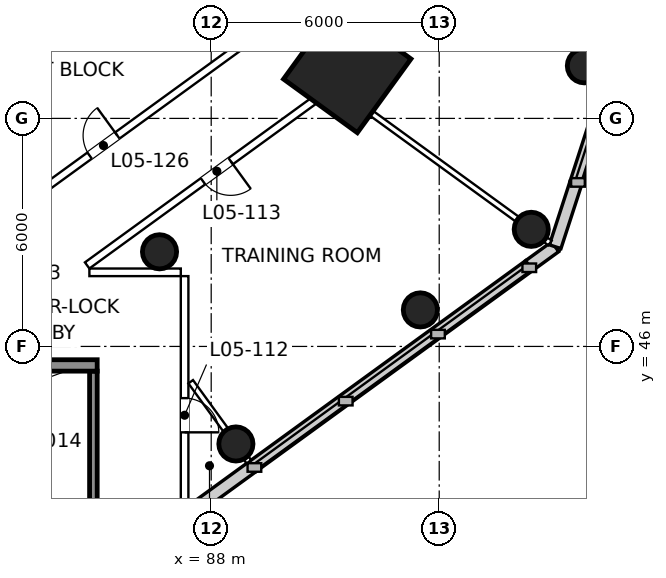
"""IFC4 building model, lengths in metres.
Left out: names, types, materials, properties, quantities, classifications, styles, units other than length and angle.
Written with IfcOpenShell. Run it as: python <this file> out.ifc"""

import sys

from ifc_helpers import new_model, si_unit, direction, frame, frame_2d, origin, origin_2d, place, context, subcontext, project, spatial, rectangle, circle, extrude, element, fill, save


model = new_model("IFC4")
c1 = context("Model", 3, precision=1e-05, world=origin(), true_north=direction((0.0, 1.0)))
c2 = subcontext(c1, "Body", "Model", "MODEL_VIEW")
j1 = project(units=[si_unit("LENGTHUNIT", "METRE"), si_unit("PLANEANGLEUNIT", "RADIAN")], contexts=[c1])
p1 = place(None, origin())
s1 = spatial("IfcSite", under=j1, at=p1, CompositionType="ELEMENT")
p2 = place(p1, origin())
s2 = spatial("IfcBuilding", under=s1, at=p2, CompositionType="ELEMENT")
p3 = place(p2, frame((0.0, 0.0, 34.0)))
s3 = spatial("IfcBuildingStorey", under=s2, at=p3, CompositionType="ELEMENT", Elevation=34.0)
p4 = place(p3, frame((86.64, 48.49, 0.0), z_axis=(0.0, 0.0, 1.0), x_axis=(1.0, 0.0, 0.0)))
e1 = element("IfcColumn", 1, at=p4, inside=s3, PredefinedType="COLUMN", context=c2, shape_type="SweptSolid", body=[
    extrude(circle(Radius=0.45, at=origin_2d()), origin(), (0.0, 0.0, 1.0), 5.0),
])
p5 = place(p3, frame((91.58, 53.3, 0.0), z_axis=(0.0, 0.0, 1.0), x_axis=(0.809016994375, -0.587785252292, 0.0)))
e2 = element("IfcColumn", 2, at=p5, inside=s3, PredefinedType="COLUMN", context=c2, shape_type="SweptSolid", body=[
    extrude(rectangle(XDim=2.4, YDim=2.4, at=origin_2d()), origin(), (0.0, 0.0, 1.0), 5.0),
])
for number, where, z_axis, x_axis in (
    (3, (88.65, 43.434, 0.0), (0.0, 0.0, 1.0), (1.0, 0.0, 0.0)),
    (4, (93.504, 46.961, 0.0), (0.0, 0.0, 1.0), (1.0, 0.0, 0.0)),
    (5, (96.422, 49.081, 0.0), (0.0, 0.0, 1.0), (1.0, 0.0, 0.0)),
    (6, (97.82, 53.384, 0.0), (0.0, 0.0, 1.0), (1.0, 0.0, 0.0)),
):
    element("IfcColumn", number, at=place(p3, frame(where, z_axis=z_axis, x_axis=x_axis)), inside=s3, PredefinedType="COLUMN", context=c2, shape_type="SweptSolid", body=[
        extrude(circle(Radius=0.45, at=origin_2d()), origin(), (0.0, 0.0, 1.0), 5.0),
    ])
p6 = place(p3, frame((81.804, 37.546, 0.0), z_axis=(0.0, 0.0, 1.0), x_axis=(0.809022210299, 0.587778073121, 0.0)))
e7 = element("IfcWall", 7, at=p6, inside=s3, PredefinedType="SOLIDWALL", context=c2, shape_type="SweptSolid", body=[
    extrude(rectangle(XDim=9.0, YDim=0.32, at=frame_2d((4.5, 0.0))), origin(), (0.0, 0.0, 1.0), 4.6),
])
p7 = place(p3, frame((89.085, 42.836, 0.0), z_axis=(0.0, 0.0, 1.0), x_axis=(0.808999938455, 0.587808727036, 0.0)))
e8 = element("IfcWall", 8, at=p7, inside=s3, PredefinedType="SOLIDWALL", context=c2, shape_type="SweptSolid", body=[
    extrude(rectangle(XDim=9.0, YDim=0.32, at=frame_2d((4.5, 0.0))), origin(), (0.0, 0.0, 1.0), 0.9),
])
p8 = place(p3, frame((96.366, 48.126, 0.0), z_axis=(0.0, 0.0, 1.0), x_axis=(0.809172006105, 0.587571837766, 0.0)))
e9 = element("IfcWall", 9, at=p8, inside=s3, PredefinedType="SOLIDWALL", context=c2, shape_type="SweptSolid", body=[
    extrude(rectangle(XDim=0.847, YDim=0.32, at=frame_2d((0.424, 0.0))), origin(), (0.0, 0.0, 1.0), 4.6),
])
p9 = place(p3, frame((97.052, 48.624, 0.0), z_axis=(0.0, 0.0, 1.0), x_axis=(0.308995332064, 0.951063554534, 0.0)))
e10 = element("IfcWall", 10, at=p9, inside=s3, PredefinedType="SOLIDWALL", context=c2, shape_type="SweptSolid", body=[
    extrude(rectangle(XDim=1.764, YDim=0.32, at=frame_2d((0.882, 0.0))), origin(), (0.0, 0.0, 1.0), 4.6),
])
p10 = place(p3, frame((97.597, 50.302, 0.0), z_axis=(0.0, 0.0, 1.0), x_axis=(0.309000197986, 0.951061973609, 0.0)))
e11 = element("IfcWall", 11, at=p10, inside=s3, PredefinedType="SOLIDWALL", context=c2, shape_type="SweptSolid", body=[
    extrude(rectangle(XDim=9.0, YDim=0.32, at=frame_2d((4.5, 0.0))), origin(), (0.0, 0.0, 1.0), 0.9),
])
p11 = place(p3, frame((84.9, 41.6, 0.0), z_axis=(0.0, 0.0, 1.0), x_axis=(0.0, 1.0, 0.0)))
e12 = element("IfcWall", 12, at=p11, inside=s3, PredefinedType="SHEAR", context=c2, shape_type="SweptSolid", body=[
    extrude(rectangle(XDim=3.75, YDim=0.2, at=frame_2d((1.875, 0.0))), origin(), (0.0, 0.0, 1.0), 5.0),
])
p12 = place(p3, frame((73.1, 45.5, 0.0), z_axis=(0.0, 0.0, 1.0), x_axis=(1.0, 0.0, 0.0)))
e13 = element("IfcWall", 13, at=p12, inside=s3, PredefinedType="SHEAR", context=c2, shape_type="SweptSolid", body=[
    extrude(rectangle(XDim=11.9, YDim=0.3, at=frame_2d((5.95, 0.0))), origin(), (0.0, 0.0, 1.0), 5.0),
])
p13 = place(p12, frame((9.35, 0.0, 0.0)))
e14 = element("IfcOpeningElement", 14, at=p13, cuts=e13, PredefinedType="OPENING", context=c2, shape_type="SweptSolid", body=[
    extrude(rectangle(XDim=1.1, YDim=2.1, at=frame_2d((0.55, 1.05))), frame((0.0, 0.16, 0.0), z_axis=(0.0, -1.0, 0.0), x_axis=(1.0, 0.0, 0.0)), (0.0, 0.0, 1.0), 0.32),
])
p14 = place(p3, frame((93.721, 60.508, 0.0), z_axis=(0.0, 0.0, 1.0), x_axis=(-0.309030308026, -0.951052190325, 0.0)))
e15 = element("IfcWall", 15, at=p14, inside=s3, PredefinedType="PARTITIONING", context=c2, shape_type="SweptSolid", body=[
    extrude(rectangle(XDim=8.019, YDim=0.2, at=frame_2d((4.009, 0.0))), origin(), (0.0, 0.0, 1.0), 4.1),
])
p15 = place(p14, frame((4.83, 0.0, 0.0)))
e16 = element("IfcOpeningElement", 16, at=p15, cuts=e15, PredefinedType="OPENING", context=c2, shape_type="SweptSolid", body=[
    extrude(rectangle(XDim=0.9, YDim=2.1, at=frame_2d((0.45, 1.05))), frame((0.0, 0.11, 0.0), z_axis=(0.0, -1.0, 0.0), x_axis=(1.0, 0.0, 0.0)), (0.0, 0.0, 1.0), 0.22),
])
p16 = place(p14, frame((0.788, 0.0, 0.0)))
e17 = element("IfcOpeningElement", 17, at=p16, cuts=e15, PredefinedType="OPENING", context=c2, shape_type="SweptSolid", body=[
    extrude(rectangle(XDim=0.9, YDim=2.1, at=frame_2d((0.45, 1.05))), frame((0.0, 0.11, 0.0), z_axis=(0.0, -1.0, 0.0), x_axis=(1.0, 0.0, 0.0)), (0.0, 0.0, 1.0), 0.22),
])
p17 = place(p3, frame((91.207, 52.832, 0.0), z_axis=(0.0, 0.0, 1.0), x_axis=(-0.809021104528, -0.58777959511, 0.0)))
e18 = element("IfcWall", 18, at=p17, inside=s3, PredefinedType="PARTITIONING", context=c2, shape_type="SweptSolid", body=[
    extrude(rectangle(XDim=7.998, YDim=0.2, at=frame_2d((3.999, 0.0))), origin(), (0.0, 0.0, 1.0), 4.1),
])
p18 = place(p17, frame((3.33, 0.0, 0.0)))
e19 = element("IfcOpeningElement", 19, at=p18, cuts=e18, PredefinedType="OPENING", context=c2, shape_type="SweptSolid", body=[
    extrude(rectangle(XDim=0.9, YDim=2.1, at=frame_2d((0.45, 1.05))), frame((0.0, 0.11, 0.0), z_axis=(0.0, -1.0, 0.0), x_axis=(1.0, 0.0, 0.0)), (0.0, 0.0, 1.0), 0.22),
])
p19 = place(p3, frame((84.795, 47.95, 0.0), z_axis=(0.0, 0.0, 1.0), x_axis=(1.0, 0.0, 0.0)))
e20 = element("IfcWall", 20, at=p19, inside=s3, PredefinedType="PARTITIONING", context=c2, shape_type="SweptSolid", body=[
    extrude(rectangle(XDim=2.405, YDim=0.2, at=frame_2d((1.203, 0.0))), origin(), (0.0, 0.0, 1.0), 4.1),
])
p20 = place(p3, frame((87.3, 47.85, 0.0), z_axis=(0.0, 0.0, 1.0), x_axis=(0.0, -1.0, 0.0)))
e21 = element("IfcWall", 21, at=p20, inside=s3, PredefinedType="PARTITIONING", context=c2, shape_type="SweptSolid", body=[
    extrude(rectangle(XDim=6.113, YDim=0.2, at=frame_2d((3.057, 0.0))), origin(), (0.0, 0.0, 1.0), 3.9),
])
p21 = place(p20, frame((3.21, 0.0, 0.0)))
e22 = element("IfcOpeningElement", 22, at=p21, cuts=e21, PredefinedType="OPENING", context=c2, shape_type="SweptSolid", body=[
    extrude(rectangle(XDim=0.9, YDim=2.1, at=frame_2d((0.45, 1.05))), frame((0.0, 0.11, 0.0), z_axis=(0.0, -1.0, 0.0), x_axis=(1.0, 0.0, 0.0)), (0.0, 0.0, 1.0), 0.22),
])
p22 = place(p3, frame((80.6, 47.969, 0.0), z_axis=(0.0, 0.0, 1.0), x_axis=(0.809010498572, 0.587794192894, 0.0)))
e23 = element("IfcWall", 23, at=p22, inside=s3, PredefinedType="PARTITIONING", context=c2, shape_type="SweptSolid", body=[
    extrude(rectangle(XDim=10.692, YDim=0.2, at=frame_2d((5.346, 0.0))), origin(), (0.0, 0.0, 1.0), 4.6),
])
p23 = place(p22, frame((5.192, 0.0, 0.0)))
e24 = element("IfcOpeningElement", 24, at=p23, cuts=e23, PredefinedType="OPENING", context=c2, shape_type="SweptSolid", body=[
    extrude(rectangle(XDim=0.9, YDim=2.1, at=frame_2d((0.45, 1.05))), frame((0.0, 0.11, 0.0), z_axis=(0.0, -1.0, 0.0), x_axis=(1.0, 0.0, 0.0)), (0.0, 0.0, 1.0), 0.22),
])
p24 = place(p3, frame((96.915, 48.723, 0.0), z_axis=(0.0, 0.0, 1.0), x_axis=(-0.809006827345, 0.587799245754, 0.0)))
e25 = element("IfcWall", 25, at=p24, inside=s3, PredefinedType="PARTITIONING", context=c2, shape_type="SweptSolid", body=[
    extrude(rectangle(XDim=6.939, YDim=0.15, at=frame_2d((3.469, 0.0))), origin(), (0.0, 0.0, 1.0), 4.6),
])
p25 = place(p3, frame((88.991, 42.965, 0.0), z_axis=(0.0, 0.0, 1.0), x_axis=(-0.5877756855, 0.80902394497, 0.0)))
e26 = element("IfcWall", 26, at=p25, inside=s3, PredefinedType="PARTITIONING", context=c2, shape_type="SweptSolid", body=[
    extrude(rectangle(XDim=2.603, YDim=0.15, at=frame_2d((1.302, 0.0))), origin(), (0.0, 0.0, 1.0), 4.6),
])
p26 = place(p21, origin())
e27 = element("IfcDoor", 27, at=p26, inside=s3, OperationType="SINGLE_SWING_RIGHT", PredefinedType="DOOR", context=c2, shape_type="SweptSolid", body=[
    extrude(rectangle(XDim=0.9, YDim=2.1, at=frame_2d((0.45, 1.05))), frame((0.0, 0.025, 0.0), z_axis=(0.0, -1.0, 0.0), x_axis=(1.0, 0.0, 0.0)), (0.0, 0.0, 1.0), 0.05),
])
fill(e22, e27)
p27 = place(p18, origin())
e28 = element("IfcDoor", 28, at=p27, inside=s3, OperationType="SINGLE_SWING_LEFT", PredefinedType="DOOR", context=c2, shape_type="SweptSolid", body=[
    extrude(rectangle(XDim=0.9, YDim=2.1, at=frame_2d((0.45, 1.05))), frame((0.0, 0.025, 0.0), z_axis=(0.0, -1.0, 0.0), x_axis=(1.0, 0.0, 0.0)), (0.0, 0.0, 1.0), 0.05),
])
fill(e19, e28)
p28 = place(p23, origin())
e29 = element("IfcDoor", 29, at=p28, inside=s3, OperationType="SINGLE_SWING_RIGHT", PredefinedType="DOOR", context=c2, shape_type="SweptSolid", body=[
    extrude(rectangle(XDim=0.9, YDim=2.1, at=frame_2d((0.45, 1.05))), frame((0.0, 0.025, 0.0), z_axis=(0.0, -1.0, 0.0), x_axis=(1.0, 0.0, 0.0)), (0.0, 0.0, 1.0), 0.05),
])
fill(e24, e29)
save(model, sys.argv[1])
